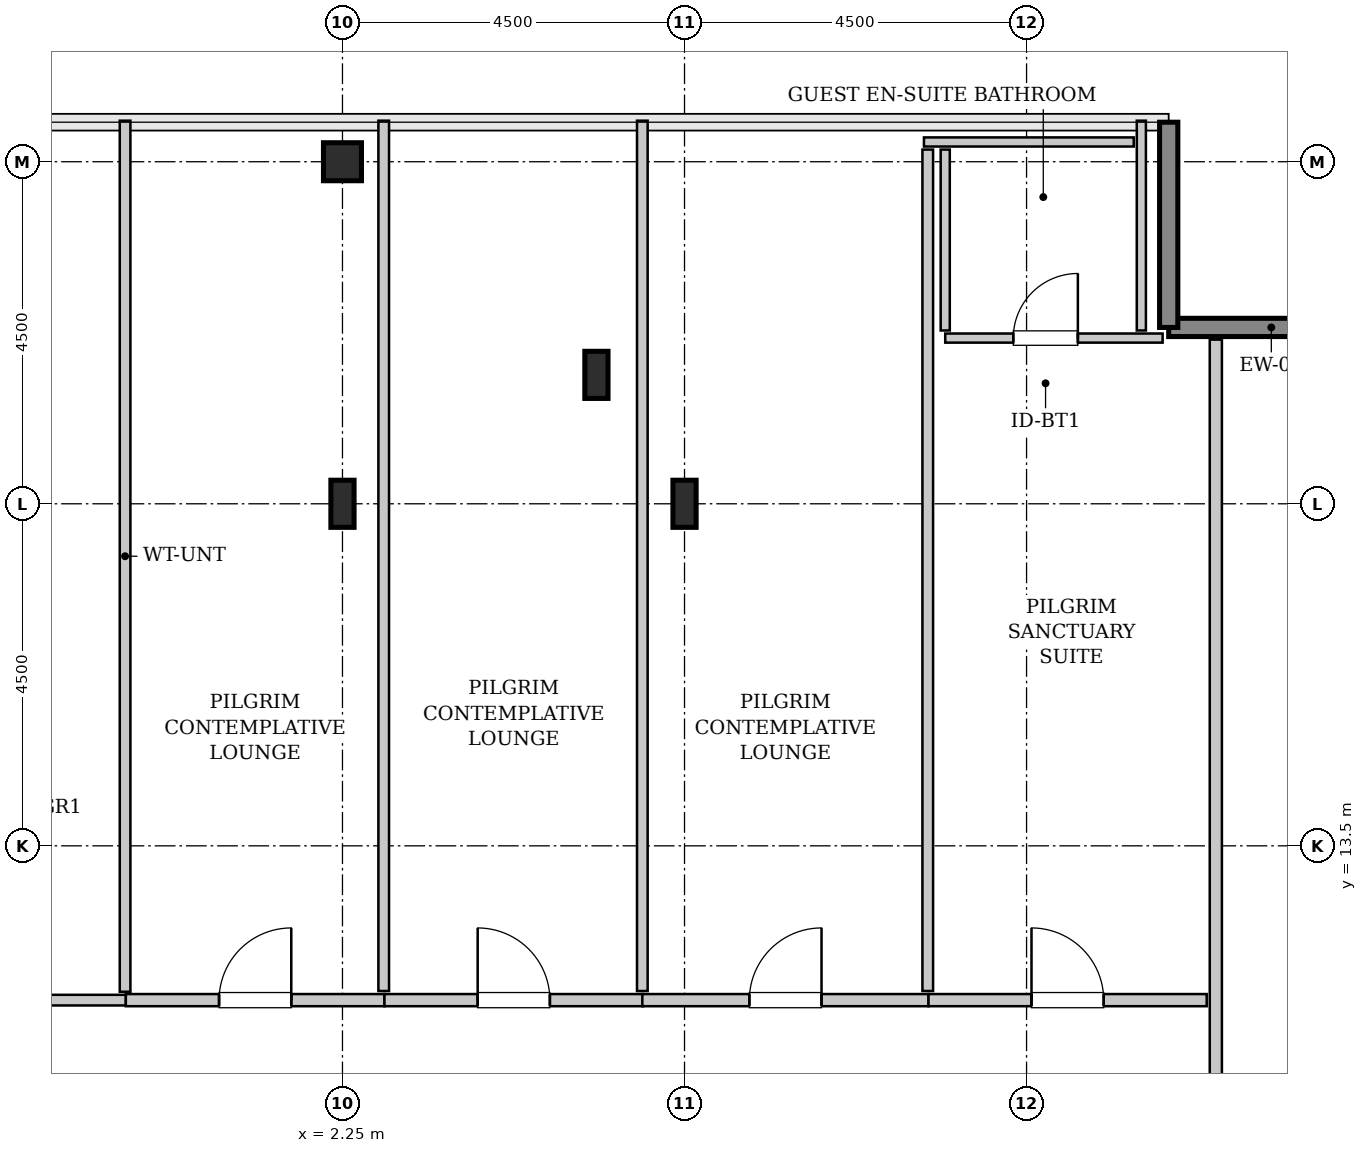
"""IFC4 building model, lengths in metres.
Left out: names, types, materials, properties, quantities, classifications, styles, units other than length and angle.
Written with IfcOpenShell. Run it as: python <this file> out.ifc"""

import sys

from ifc_helpers import new_model, si_unit, direction, frame, frame_2d, origin, origin_2d, place, context, subcontext, project, spatial, rectangle, hollow_rectangle, i_section, extrude, source, transform, mapped, element, fill, save


model = new_model("IFC4")
c1 = context("Model", 3, precision=1e-05, world=origin(), true_north=direction((0.0, 1.0)))
c2 = subcontext(c1, "Body", "Model", "MODEL_VIEW")
j1 = project(units=[si_unit("LENGTHUNIT", "METRE"), si_unit("PLANEANGLEUNIT", "RADIAN")], contexts=[c1])
p1 = place(None, origin())
s1 = spatial("IfcSite", under=j1, at=p1, CompositionType="ELEMENT")
p2 = place(p1, origin())
s2 = spatial("IfcBuilding", under=s1, at=p2, CompositionType="ELEMENT")
p3 = place(p2, frame((0.0, 0.0, 341.4)))
s3 = spatial("IfcBuildingStorey", under=s2, at=p3, CompositionType="ELEMENT", Elevation=341.4)
m1 = source(origin(), c2, "Body", "SweptSolid", [
    extrude(i_section(OverallWidth=0.305, OverallDepth=0.62, WebThickness=0.021, FlangeThickness=0.04, FilletRadius=0.027, at=origin_2d()), origin(), (0.0, 0.0, 1.0), 3.8),
])
p4 = place(p3, frame((2.25, 18.0, 0.0), z_axis=(0.0, 0.0, 1.0), x_axis=(1.0, 0.0, 0.0)))
e1 = element("IfcColumn", 1, at=p4, inside=s3, PredefinedType="COLUMN", context=c2, shape_type="MappedRepresentation", body=[
    mapped(m1, transform((0.0, 0.0, 0.0), x_axis=(1.0, 0.0, 0.0), y_axis=(0.0, 1.0, 0.0), z_axis=(0.0, 0.0, 1.0), scale=1.0)),
])
m2 = source(origin(), c2, "Body", "SweptSolid", [
    extrude(hollow_rectangle(XDim=0.5, YDim=0.5, WallThickness=0.025, InnerFilletRadius=0.025, OuterFilletRadius=0.05, at=origin_2d()), origin(), (0.0, 0.0, 1.0), 3.8),
])
p5 = place(p3, frame((2.25, 22.5, 0.0), z_axis=(0.0, 0.0, 1.0), x_axis=(1.0, 0.0, 0.0)))
e2 = element("IfcColumn", 2, at=p5, inside=s3, PredefinedType="COLUMN", context=c2, shape_type="MappedRepresentation", body=[
    mapped(m2, transform((0.0, 0.0, 0.0), x_axis=(1.0, 0.0, 0.0), y_axis=(0.0, 1.0, 0.0), z_axis=(0.0, 0.0, 1.0), scale=1.0)),
])
for number, where, z_axis, x_axis in (
    (3, (5.591, 19.696, 0.0), (0.0, 0.0, 1.0), (1.0, 0.0, 0.0)),
    (4, (6.75, 18.0, 0.0), (0.0, 0.0, 1.0), (1.0, 0.0, 0.0)),
):
    element("IfcColumn", number, at=place(p3, frame(where, z_axis=z_axis, x_axis=x_axis)), inside=s3, PredefinedType="COLUMN", context=c2, shape_type="MappedRepresentation", body=[
        mapped(m1, transform((0.0, 0.0, 0.0), x_axis=(1.0, 0.0, 0.0), y_axis=(0.0, 1.0, 0.0), z_axis=(0.0, 0.0, 1.0), scale=1.0)),
    ])
m3 = source(origin(), c2, "Body", "SweptSolid", [
    extrude(rectangle(XDim=2.7, YDim=0.24, at=frame_2d((1.35, 0.0))), origin(), (0.0, 0.0, 1.0), 3.55),
])
for number, where, z_axis, x_axis in (
    (5, (15.82, 20.32, 0.0), (0.0, 0.0, 1.0), (-1.0, 0.0, 0.0)),
    (6, (13.12, 20.32, 0.0), (0.0, 0.0, 1.0), (0.0, 1.0, 0.0)),
):
    element("IfcWall", number, at=place(p3, frame(where, z_axis=z_axis, x_axis=x_axis)), inside=s3, PredefinedType="SHEAR", context=c2, shape_type="MappedRepresentation", body=[
        mapped(m3, transform((0.0, 0.0, 0.0), x_axis=(1.0, 0.0, 0.0), y_axis=(0.0, 1.0, 0.0), z_axis=(0.0, 0.0, 1.0), scale=1.0)),
    ])
m4 = source(origin(), c2, "Body", "SweptSolid", [
    extrude(rectangle(XDim=2.86, YDim=0.12, at=frame_2d((1.43, 0.0))), origin(), (0.0, 0.0, 1.0), 3.535),
])
p6 = place(p3, frame((10.18, 20.18, 0.0), z_axis=(0.0, 0.0, 1.0), x_axis=(1.0, 0.0, 0.0)))
e7 = element("IfcWall", 7, at=p6, inside=s3, PredefinedType="PLUMBINGWALL", context=c2, shape_type="MappedRepresentation", body=[
    mapped(m4, transform((0.0, 0.0, 0.0), x_axis=(1.0, 0.0, 0.0), y_axis=(0.0, 1.0, 0.0), z_axis=(0.0, 0.0, 1.0), scale=1.0)),
])
p7 = place(p6, frame((0.895, 0.0, 0.0)))
e8 = element("IfcOpeningElement", 8, at=p7, cuts=e7, PredefinedType="OPENING", context=c2, shape_type="SweptSolid", body=[
    extrude(rectangle(XDim=0.85, YDim=2.1, at=frame_2d((0.425, 1.05))), frame((0.0, 0.07, 0.0), z_axis=(0.0, -1.0, 0.0), x_axis=(1.0, 0.0, 0.0)), (0.0, 0.0, 1.0), 0.14),
])
m5 = source(origin(), c2, "Body", "SweptSolid", [
    extrude(rectangle(XDim=2.76, YDim=0.12, at=frame_2d((1.38, 0.0))), origin(), (0.0, 0.0, 1.0), 3.535),
])
for number, where, z_axis, x_axis in (
    (9, (12.76, 20.28, 0.0), (0.0, 0.0, 1.0), (0.0, 1.0, 0.0)),
    (10, (9.9, 22.76, 0.0), (0.0, 0.0, 1.0), (1.0, 0.0, 0.0)),
):
    element("IfcWall", number, at=place(p3, frame(where, z_axis=z_axis, x_axis=x_axis)), inside=s3, PredefinedType="PLUMBINGWALL", context=c2, shape_type="MappedRepresentation", body=[
        mapped(m5, transform((0.0, 0.0, 0.0), x_axis=(1.0, 0.0, 0.0), y_axis=(0.0, 1.0, 0.0), z_axis=(0.0, 0.0, 1.0), scale=1.0)),
    ])
m6 = source(origin(), c2, "Body", "SweptSolid", [
    extrude(rectangle(XDim=2.38, YDim=0.12, at=frame_2d((1.19, 0.0))), origin(), (0.0, 0.0, 1.0), 3.535),
])
p8 = place(p3, frame((10.18, 20.28, 0.0), z_axis=(0.0, 0.0, 1.0), x_axis=(0.0, 1.0, 0.0)))
e11 = element("IfcWall", 11, at=p8, inside=s3, PredefinedType="PLUMBINGWALL", context=c2, shape_type="MappedRepresentation", body=[
    mapped(m6, transform((0.0, 0.0, 0.0), x_axis=(1.0, 0.0, 0.0), y_axis=(0.0, 1.0, 0.0), z_axis=(0.0, 0.0, 1.0), scale=1.0)),
])
m7 = source(origin(), c2, "Body", "SweptSolid", [
    extrude(rectangle(XDim=12.365, YDim=0.16, at=frame_2d((6.183, 0.0))), origin(), (0.0, 0.0, 1.0), 3.535),
])
p9 = place(p3, frame((13.74, 7.795, 0.0), z_axis=(0.0, 0.0, 1.0), x_axis=(0.0, 1.0, 0.0)))
e12 = element("IfcWall", 12, at=p9, inside=s3, PredefinedType="PARTITIONING", context=c2, shape_type="MappedRepresentation", body=[
    mapped(m7, transform((0.0, 0.0, 0.0), x_axis=(1.0, 0.0, 0.0), y_axis=(0.0, 1.0, 0.0), z_axis=(0.0, 0.0, 1.0), scale=1.0)),
])
p10 = place(p9, frame((1.383, 0.0, 0.0)))
e13 = element("IfcOpeningElement", 13, at=p10, cuts=e12, PredefinedType="OPENING", context=c2, shape_type="SweptSolid", body=[
    extrude(rectangle(XDim=0.95, YDim=2.1, at=frame_2d((0.475, 1.05))), frame((0.0, 0.09, 0.0), z_axis=(0.0, -1.0, 0.0), x_axis=(1.0, 0.0, 0.0)), (0.0, 0.0, 1.0), 0.18),
])
m8 = source(origin(), c2, "Body", "SweptSolid", [
    extrude(rectangle(XDim=2.21, YDim=0.14, at=frame_2d((1.105, 0.0))), origin(), (0.0, 0.0, 1.0), 3.535),
])
p11 = place(p3, frame((-2.81, 11.47, 0.0), z_axis=(0.0, 0.0, 1.0), x_axis=(1.0, 0.0, 0.0)))
e14 = element("IfcWall", 14, at=p11, inside=s3, PredefinedType="PARTITIONING", context=c2, shape_type="MappedRepresentation", body=[
    mapped(m8, transform((0.0, 0.0, 0.0), x_axis=(1.0, 0.0, 0.0), y_axis=(0.0, 1.0, 0.0), z_axis=(0.0, 0.0, 1.0), scale=1.0)),
])
m9 = source(origin(), c2, "Body", "SweptSolid", [
    extrude(rectangle(XDim=11.46, YDim=0.14, at=frame_2d((5.73, 0.0))), origin(), (0.0, 0.0, 1.0), 3.535),
])
p12 = place(p3, frame((-0.61, 11.58, 0.0), z_axis=(0.0, 0.0, 1.0), x_axis=(0.0, 1.0, 0.0)))
e15 = element("IfcWall", 15, at=p12, inside=s3, PredefinedType="PARTITIONING", context=c2, shape_type="MappedRepresentation", body=[
    mapped(m9, transform((0.0, 0.0, 0.0), x_axis=(1.0, 0.0, 0.0), y_axis=(0.0, 1.0, 0.0), z_axis=(0.0, 0.0, 1.0), scale=1.0)),
])
m10 = source(origin(), c2, "Body", "SweptSolid", [
    extrude(rectangle(XDim=3.403, YDim=0.16, at=frame_2d((1.701, 0.0))), origin(), (0.0, 0.0, 1.0), 3.535),
])
p13 = place(p3, frame((-0.6, 11.47, 0.0), z_axis=(0.0, 0.0, 1.0), x_axis=(1.0, 0.0, 0.0)))
e16 = element("IfcWall", 16, at=p13, inside=s3, PredefinedType="PARTITIONING", context=c2, shape_type="MappedRepresentation", body=[
    mapped(m10, transform((0.0, 0.0, 0.0), x_axis=(1.0, 0.0, 0.0), y_axis=(0.0, 1.0, 0.0), z_axis=(0.0, 0.0, 1.0), scale=1.0)),
])
p14 = place(p13, frame((1.226, 0.0, 0.0)))
e17 = element("IfcOpeningElement", 17, at=p14, cuts=e16, PredefinedType="OPENING", context=c2, shape_type="SweptSolid", body=[
    extrude(rectangle(XDim=0.95, YDim=2.1, at=frame_2d((0.475, 1.05))), frame((0.0, 0.09, 0.0), z_axis=(0.0, -1.0, 0.0), x_axis=(1.0, 0.0, 0.0)), (0.0, 0.0, 1.0), 0.18),
])
m11 = source(origin(), c2, "Body", "SweptSolid", [
    extrude(rectangle(XDim=11.45, YDim=0.14, at=frame_2d((5.725, 0.0))), origin(), (0.0, 0.0, 1.0), 3.535),
])
p15 = place(p3, frame((2.792, 11.59, 0.0), z_axis=(0.0, 0.0, 1.0), x_axis=(0.0, 1.0, 0.0)))
e18 = element("IfcWall", 18, at=p15, inside=s3, PredefinedType="PARTITIONING", context=c2, shape_type="MappedRepresentation", body=[
    mapped(m11, transform((0.0, 0.0, 0.0), x_axis=(1.0, 0.0, 0.0), y_axis=(0.0, 1.0, 0.0), z_axis=(0.0, 0.0, 1.0), scale=1.0)),
])
p16 = place(p3, frame((2.802, 11.47, 0.0), z_axis=(0.0, 0.0, 1.0), x_axis=(1.0, 0.0, 0.0)))
e19 = element("IfcWall", 19, at=p16, inside=s3, PredefinedType="PARTITIONING", context=c2, shape_type="MappedRepresentation", body=[
    mapped(m10, transform((0.0, 0.0, 0.0), x_axis=(1.0, 0.0, 0.0), y_axis=(0.0, 1.0, 0.0), z_axis=(0.0, 0.0, 1.0), scale=1.0)),
])
p17 = place(p16, frame((1.226, 0.0, 0.0)))
e20 = element("IfcOpeningElement", 20, at=p17, cuts=e19, PredefinedType="OPENING", context=c2, shape_type="SweptSolid", body=[
    extrude(rectangle(XDim=0.95, YDim=2.1, at=frame_2d((0.475, 1.05))), frame((0.0, 0.09, 0.0), z_axis=(0.0, -1.0, 0.0), x_axis=(1.0, 0.0, 0.0)), (0.0, 0.0, 1.0), 0.18),
])
p18 = place(p3, frame((6.195, 11.59, 0.0), z_axis=(0.0, 0.0, 1.0), x_axis=(0.0, 1.0, 0.0)))
e21 = element("IfcWall", 21, at=p18, inside=s3, PredefinedType="PARTITIONING", context=c2, shape_type="MappedRepresentation", body=[
    mapped(m11, transform((0.0, 0.0, 0.0), x_axis=(1.0, 0.0, 0.0), y_axis=(0.0, 1.0, 0.0), z_axis=(0.0, 0.0, 1.0), scale=1.0)),
])
m12 = source(origin(), c2, "Body", "SweptSolid", [
    extrude(rectangle(XDim=3.765, YDim=0.16, at=frame_2d((1.882, 0.0))), origin(), (0.0, 0.0, 1.0), 3.535),
])
p19 = place(p3, frame((6.195, 11.47, 0.0), z_axis=(0.0, 0.0, 1.0), x_axis=(1.0, 0.0, 0.0)))
e22 = element("IfcWall", 22, at=p19, inside=s3, PredefinedType="PARTITIONING", context=c2, shape_type="MappedRepresentation", body=[
    mapped(m12, transform((0.0, 0.0, 0.0), x_axis=(1.0, 0.0, 0.0), y_axis=(0.0, 1.0, 0.0), z_axis=(0.0, 0.0, 1.0), scale=1.0)),
])
p20 = place(p19, frame((1.407, 0.0, 0.0)))
e23 = element("IfcOpeningElement", 23, at=p20, cuts=e22, PredefinedType="OPENING", context=c2, shape_type="SweptSolid", body=[
    extrude(rectangle(XDim=0.95, YDim=2.1, at=frame_2d((0.475, 1.05))), frame((0.0, 0.09, 0.0), z_axis=(0.0, -1.0, 0.0), x_axis=(1.0, 0.0, 0.0)), (0.0, 0.0, 1.0), 0.18),
])
m13 = source(origin(), c2, "Body", "SweptSolid", [
    extrude(rectangle(XDim=11.07, YDim=0.14, at=frame_2d((5.535, 0.0))), origin(), (0.0, 0.0, 1.0), 3.535),
])
p21 = place(p3, frame((9.95, 11.59, 0.0), z_axis=(0.0, 0.0, 1.0), x_axis=(0.0, 1.0, 0.0)))
e24 = element("IfcWall", 24, at=p21, inside=s3, PredefinedType="PARTITIONING", context=c2, shape_type="MappedRepresentation", body=[
    mapped(m13, transform((0.0, 0.0, 0.0), x_axis=(1.0, 0.0, 0.0), y_axis=(0.0, 1.0, 0.0), z_axis=(0.0, 0.0, 1.0), scale=1.0)),
])
m14 = source(origin(), c2, "Body", "SweptSolid", [
    extrude(rectangle(XDim=3.66, YDim=0.16, at=frame_2d((1.83, 0.0))), origin(), (0.0, 0.0, 1.0), 3.535),
])
p22 = place(p3, frame((9.96, 11.47, 0.0), z_axis=(0.0, 0.0, 1.0), x_axis=(1.0, 0.0, 0.0)))
e25 = element("IfcWall", 25, at=p22, inside=s3, PredefinedType="PARTITIONING", context=c2, shape_type="MappedRepresentation", body=[
    mapped(m14, transform((0.0, 0.0, 0.0), x_axis=(1.0, 0.0, 0.0), y_axis=(0.0, 1.0, 0.0), z_axis=(0.0, 0.0, 1.0), scale=1.0)),
])
p23 = place(p22, frame((1.355, 0.0, 0.0)))
e26 = element("IfcOpeningElement", 26, at=p23, cuts=e25, PredefinedType="OPENING", context=c2, shape_type="SweptSolid", body=[
    extrude(rectangle(XDim=0.95, YDim=2.1, at=frame_2d((0.475, 1.05))), frame((0.0, 0.09, 0.0), z_axis=(0.0, -1.0, 0.0), x_axis=(1.0, 0.0, 0.0)), (0.0, 0.0, 1.0), 0.18),
])
m15 = source(origin(), c2, "Body", "SweptSolid", [
    extrude(rectangle(XDim=0.85, YDim=2.1, at=frame_2d((0.425, 1.05))), frame((0.0, 0.025, 0.0), z_axis=(0.0, -1.0, 0.0), x_axis=(1.0, 0.0, 0.0)), (0.0, 0.0, 1.0), 0.05),
])
p24 = place(p7, origin())
e27 = element("IfcDoor", 27, at=p24, inside=s3, OperationType="SINGLE_SWING_RIGHT", PredefinedType="DOOR", context=c2, shape_type="MappedRepresentation", body=[
    mapped(m15, transform((0.0, 0.0, 0.0), x_axis=(1.0, 0.0, 0.0), y_axis=(0.0, 1.0, 0.0), z_axis=(0.0, 0.0, 1.0), scale=1.0)),
])
fill(e8, e27)
m16 = source(origin(), c2, "Body", "SweptSolid", [
    extrude(rectangle(XDim=0.95, YDim=2.1, at=frame_2d((0.475, 1.05))), frame((0.0, 0.025, 0.0), z_axis=(0.0, -1.0, 0.0), x_axis=(1.0, 0.0, 0.0)), (0.0, 0.0, 1.0), 0.05),
])
p25 = place(p14, origin())
e28 = element("IfcDoor", 28, at=p25, inside=s3, OperationType="SINGLE_SWING_RIGHT", PredefinedType="DOOR", context=c2, shape_type="MappedRepresentation", body=[
    mapped(m16, transform((0.0, 0.0, 0.0), x_axis=(1.0, 0.0, 0.0), y_axis=(0.0, 1.0, 0.0), z_axis=(0.0, 0.0, 1.0), scale=1.0)),
])
fill(e17, e28)
p26 = place(p17, origin())
e29 = element("IfcDoor", 29, at=p26, inside=s3, OperationType="SINGLE_SWING_LEFT", PredefinedType="DOOR", context=c2, shape_type="MappedRepresentation", body=[
    mapped(m16, transform((0.0, 0.0, 0.0), x_axis=(1.0, 0.0, 0.0), y_axis=(0.0, 1.0, 0.0), z_axis=(0.0, 0.0, 1.0), scale=1.0)),
])
fill(e20, e29)
p27 = place(p20, origin())
e30 = element("IfcDoor", 30, at=p27, inside=s3, OperationType="SINGLE_SWING_RIGHT", PredefinedType="DOOR", context=c2, shape_type="MappedRepresentation", body=[
    mapped(m16, transform((0.0, 0.0, 0.0), x_axis=(1.0, 0.0, 0.0), y_axis=(0.0, 1.0, 0.0), z_axis=(0.0, 0.0, 1.0), scale=1.0)),
])
fill(e23, e30)
p28 = place(p23, origin())
e31 = element("IfcDoor", 31, at=p28, inside=s3, OperationType="SINGLE_SWING_LEFT", PredefinedType="DOOR", context=c2, shape_type="MappedRepresentation", body=[
    mapped(m16, transform((0.0, 0.0, 0.0), x_axis=(1.0, 0.0, 0.0), y_axis=(0.0, 1.0, 0.0), z_axis=(0.0, 0.0, 1.0), scale=1.0)),
])
fill(e26, e31)
save(model, sys.argv[1])
